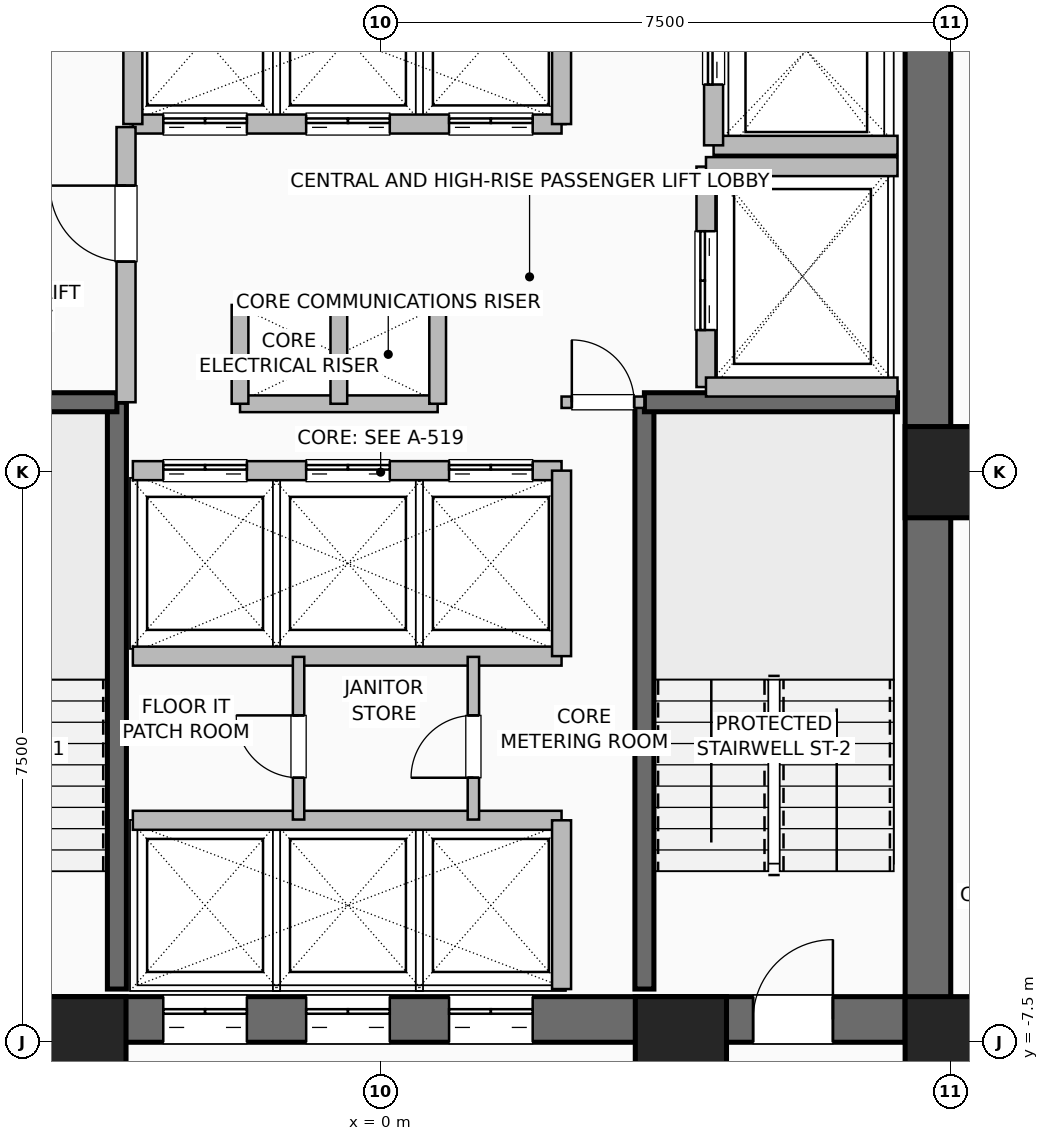
"""IFC4 building model, lengths in metres.
Left out: names, types, materials, properties, quantities, classifications, styles, units other than length and angle.
Written with IfcOpenShell. Run it as: python <this file> out.ifc"""

import sys

from ifc_helpers import new_model, si_unit, direction, frame, frame_2d, origin, origin_2d, place, context, subcontext, project, spatial, rectangle, hollow_rectangle, extrude, element, fill, save


model = new_model("IFC4")
c1 = context("Model", 3, precision=1e-05, world=origin(), true_north=direction((0.0, 1.0)))
c2 = subcontext(c1, "Body", "Model", "MODEL_VIEW")
j1 = project(units=[si_unit("LENGTHUNIT", "METRE"), si_unit("PLANEANGLEUNIT", "RADIAN")], contexts=[c1])
p1 = place(None, origin())
s1 = spatial("IfcSite", under=j1, at=p1, CompositionType="ELEMENT")
p2 = place(p1, origin())
s2 = spatial("IfcBuilding", under=s1, at=p2, CompositionType="ELEMENT")
p3 = place(p2, frame((0.0, 0.0, 72.5)))
s3 = spatial("IfcBuildingStorey", under=s2, at=p3, CompositionType="ELEMENT", Elevation=72.5)
for number, where, z_axis, x_axis in (
    (1, (-3.95, -7.5, 0.0), (0.0, 0.0, 1.0), (1.0, 0.0, 0.0)),
    (2, (3.95, -7.5, 0.0), (0.0, 0.0, 1.0), (1.0, 0.0, 0.0)),
    (3, (7.5, -7.5, 0.0), (0.0, 0.0, 1.0), (1.0, 0.0, 0.0)),
    (4, (7.5, 0.0, 0.0), (0.0, 0.0, 1.0), (1.0, 0.0, 0.0)),
):
    element("IfcColumn", number, at=place(p3, frame(where, z_axis=z_axis, x_axis=x_axis)), inside=s3, PredefinedType="COLUMN", context=c2, shape_type="SweptSolid", body=[
        extrude(hollow_rectangle(XDim=1.2, YDim=1.2, WallThickness=0.055, at=origin_2d()), origin(), (0.0, 0.0, 1.0), 3.5),
    ])
p4 = place(p3, frame((-7.5, -7.2, 0.0), z_axis=(0.0, 0.0, 1.0), x_axis=(1.0, 0.0, 0.0)))
e5 = element("IfcWall", 5, at=p4, inside=s3, PredefinedType="SHEAR", context=c2, shape_type="SweptSolid", body=[
    extrude(rectangle(XDim=15.0, YDim=0.6, at=frame_2d((7.5, 0.0))), origin(), (0.0, 0.0, 1.0), 3.25),
])
p5 = place(p4, frame((1.55, 0.0, 0.0)))
e6 = element("IfcOpeningElement", 6, at=p5, cuts=e5, PredefinedType="OPENING", context=c2, shape_type="SweptSolid", body=[
    extrude(rectangle(XDim=1.05, YDim=2.08, at=frame_2d((0.525, 1.04))), frame((0.0, 0.31, 0.0), z_axis=(0.0, -1.0, 0.0), x_axis=(1.0, 0.0, 0.0)), (0.0, 0.0, 1.0), 0.62),
])
p6 = place(p4, frame((12.4, 0.0, 0.0)))
e7 = element("IfcOpeningElement", 7, at=p6, cuts=e5, PredefinedType="OPENING", context=c2, shape_type="SweptSolid", body=[
    extrude(rectangle(XDim=1.05, YDim=2.08, at=frame_2d((0.525, 1.04))), frame((0.0, 0.31, 0.0), z_axis=(0.0, -1.0, 0.0), x_axis=(1.0, 0.0, 0.0)), (0.0, 0.0, 1.0), 0.62),
])
p7 = place(p4, frame((4.64, 0.0, 0.0)))
e8 = element("IfcOpeningElement", 8, at=p7, cuts=e5, PredefinedType="OPENING", context=c2, shape_type="SweptSolid", body=[
    extrude(rectangle(XDim=1.1, YDim=2.2, at=frame_2d((0.55, 1.1))), frame((0.0, 0.31, 0.0), z_axis=(0.0, -1.0, 0.0), x_axis=(1.0, 0.0, 0.0)), (0.0, 0.0, 1.0), 0.62),
])
p8 = place(p4, frame((6.52, 0.0, 0.0)))
e9 = element("IfcOpeningElement", 9, at=p8, cuts=e5, PredefinedType="OPENING", context=c2, shape_type="SweptSolid", body=[
    extrude(rectangle(XDim=1.1, YDim=2.2, at=frame_2d((0.55, 1.1))), frame((0.0, 0.31, 0.0), z_axis=(0.0, -1.0, 0.0), x_axis=(1.0, 0.0, 0.0)), (0.0, 0.0, 1.0), 0.62),
])
p9 = place(p4, frame((8.4, 0.0, 0.0)))
e10 = element("IfcOpeningElement", 10, at=p9, cuts=e5, PredefinedType="OPENING", context=c2, shape_type="SweptSolid", body=[
    extrude(rectangle(XDim=1.1, YDim=2.2, at=frame_2d((0.55, 1.1))), frame((0.0, 0.31, 0.0), z_axis=(0.0, -1.0, 0.0), x_axis=(1.0, 0.0, 0.0)), (0.0, 0.0, 1.0), 0.62),
])
p10 = place(p3, frame((7.2, -7.5, 0.0), z_axis=(0.0, 0.0, 1.0), x_axis=(0.0, 1.0, 0.0)))
e11 = element("IfcWall", 11, at=p10, inside=s3, PredefinedType="SHEAR", context=c2, shape_type="SweptSolid", body=[
    extrude(rectangle(XDim=15.0, YDim=0.6, at=frame_2d((7.5, 0.0))), origin(), (0.0, 0.0, 1.0), 3.25),
])
p11 = place(p3, frame((-3.47, -6.8, 0.0), z_axis=(0.0, 0.0, 1.0), x_axis=(0.0, 1.0, 0.0)))
e12 = element("IfcWall", 12, at=p11, inside=s3, PredefinedType="SHEAR", context=c2, shape_type="SweptSolid", body=[
    extrude(rectangle(XDim=7.72, YDim=0.25, at=frame_2d((3.86, 0.0))), origin(), (0.0, 0.0, 1.0), 3.25),
])
p12 = place(p3, frame((-6.8, 0.92, 0.0), z_axis=(0.0, 0.0, 1.0), x_axis=(1.0, 0.0, 0.0)))
e13 = element("IfcWall", 13, at=p12, inside=s3, PredefinedType="SHEAR", context=c2, shape_type="SweptSolid", body=[
    extrude(rectangle(XDim=3.33, YDim=0.25, at=frame_2d((1.665, 0.0))), origin(), (0.0, 0.0, 1.0), 3.25),
])
p13 = place(p3, frame((3.47, -6.8, 0.0), z_axis=(0.0, 0.0, 1.0), x_axis=(0.0, 1.0, 0.0)))
e14 = element("IfcWall", 14, at=p13, inside=s3, PredefinedType="SHEAR", context=c2, shape_type="SweptSolid", body=[
    extrude(rectangle(XDim=7.72, YDim=0.25, at=frame_2d((3.86, 0.0))), origin(), (0.0, 0.0, 1.0), 3.25),
])
p14 = place(p3, frame((3.47, 0.92, 0.0), z_axis=(0.0, 0.0, 1.0), x_axis=(1.0, 0.0, 0.0)))
e15 = element("IfcWall", 15, at=p14, inside=s3, PredefinedType="SHEAR", context=c2, shape_type="SweptSolid", body=[
    extrude(rectangle(XDim=3.33, YDim=0.25, at=frame_2d((1.665, 0.0))), origin(), (0.0, 0.0, 1.0), 3.25),
])
for number, where, z_axis, x_axis in (
    (16, (-1.85, 2.2, 0.0), (0.0, 0.0, 1.0), (1.0, 0.0, 0.0)),
    (17, (-1.85, 0.9, 0.0), (0.0, 0.0, 1.0), (1.0, 0.0, 0.0)),
):
    element("IfcWall", number, at=place(p3, frame(where, z_axis=z_axis, x_axis=x_axis)), inside=s3, PredefinedType="PARTITIONING", context=c2, shape_type="SweptSolid", body=[
        extrude(rectangle(XDim=2.6, YDim=0.22, at=frame_2d((1.3, 0.0))), origin(), (0.0, 0.0, 1.0), 3.25),
    ])
for number, where, z_axis, x_axis in (
    (18, (-0.55, 0.9, 0.0), (0.0, 0.0, 1.0), (0.0, 1.0, 0.0)),
    (19, (0.75, 0.9, 0.0), (0.0, 0.0, 1.0), (0.0, 1.0, 0.0)),
    (20, (-1.85, 0.9, 0.0), (0.0, 0.0, 1.0), (0.0, 1.0, 0.0)),
):
    element("IfcWall", number, at=place(p3, frame(where, z_axis=z_axis, x_axis=x_axis)), inside=s3, PredefinedType="PARTITIONING", context=c2, shape_type="SweptSolid", body=[
        extrude(rectangle(XDim=1.3, YDim=0.22, at=frame_2d((0.65, 0.0))), origin(), (0.0, 0.0, 1.0), 3.25),
    ])
p15 = place(p3, frame((-3.26, -4.58, 0.0), z_axis=(0.0, 0.0, 1.0), x_axis=(1.0, 0.0, 0.0)))
e21 = element("IfcWall", 21, at=p15, inside=s3, PredefinedType="SHEAR", context=c2, shape_type="SweptSolid", body=[
    extrude(rectangle(XDim=5.64, YDim=0.25, at=frame_2d((2.82, 0.0))), origin(), (0.0, 0.0, 1.0), 3.25),
])
p16 = place(p3, frame((2.38, -6.8, 0.0), z_axis=(0.0, 0.0, 1.0), x_axis=(0.0, 1.0, 0.0)))
e22 = element("IfcWall", 22, at=p16, inside=s3, PredefinedType="SHEAR", context=c2, shape_type="SweptSolid", body=[
    extrude(rectangle(XDim=2.22, YDim=0.25, at=frame_2d((1.11, 0.0))), origin(), (0.0, 0.0, 1.0), 3.25),
])
p17 = place(p3, frame((-3.26, 0.02, 0.0), z_axis=(0.0, 0.0, 1.0), x_axis=(1.0, 0.0, 0.0)))
e23 = element("IfcWall", 23, at=p17, inside=s3, PredefinedType="SHEAR", context=c2, shape_type="SweptSolid", body=[
    extrude(rectangle(XDim=5.64, YDim=0.25, at=frame_2d((2.82, 0.0))), origin(), (0.0, 0.0, 1.0), 3.25),
])
p18 = place(p17, frame((0.4, 0.0, 0.0)))
e24 = element("IfcOpeningElement", 24, at=p18, cuts=e23, PredefinedType="OPENING", context=c2, shape_type="SweptSolid", body=[
    extrude(rectangle(XDim=1.1, YDim=2.2, at=frame_2d((0.55, 1.1))), frame((0.0, 0.135, 0.0), z_axis=(0.0, -1.0, 0.0), x_axis=(1.0, 0.0, 0.0)), (0.0, 0.0, 1.0), 0.27),
])
p19 = place(p17, frame((2.28, 0.0, 0.0)))
e25 = element("IfcOpeningElement", 25, at=p19, cuts=e23, PredefinedType="OPENING", context=c2, shape_type="SweptSolid", body=[
    extrude(rectangle(XDim=1.1, YDim=2.2, at=frame_2d((0.55, 1.1))), frame((0.0, 0.135, 0.0), z_axis=(0.0, -1.0, 0.0), x_axis=(1.0, 0.0, 0.0)), (0.0, 0.0, 1.0), 0.27),
])
p20 = place(p17, frame((4.16, 0.0, 0.0)))
e26 = element("IfcOpeningElement", 26, at=p20, cuts=e23, PredefinedType="OPENING", context=c2, shape_type="SweptSolid", body=[
    extrude(rectangle(XDim=1.1, YDim=2.2, at=frame_2d((0.55, 1.1))), frame((0.0, 0.135, 0.0), z_axis=(0.0, -1.0, 0.0), x_axis=(1.0, 0.0, 0.0)), (0.0, 0.0, 1.0), 0.27),
])
p21 = place(p3, frame((-3.26, -2.42, 0.0), z_axis=(0.0, 0.0, 1.0), x_axis=(1.0, 0.0, 0.0)))
e27 = element("IfcWall", 27, at=p21, inside=s3, PredefinedType="SHEAR", context=c2, shape_type="SweptSolid", body=[
    extrude(rectangle(XDim=5.64, YDim=0.25, at=frame_2d((2.82, 0.0))), origin(), (0.0, 0.0, 1.0), 3.25),
])
p22 = place(p3, frame((2.38, -2.42, 0.0), z_axis=(0.0, 0.0, 1.0), x_axis=(0.0, 1.0, 0.0)))
e28 = element("IfcWall", 28, at=p22, inside=s3, PredefinedType="SHEAR", context=c2, shape_type="SweptSolid", body=[
    extrude(rectangle(XDim=2.44, YDim=0.25, at=frame_2d((1.22, 0.0))), origin(), (0.0, 0.0, 1.0), 3.25),
])
p23 = place(p3, frame((-3.26, 4.58, 0.0), z_axis=(0.0, 0.0, 1.0), x_axis=(1.0, 0.0, 0.0)))
e29 = element("IfcWall", 29, at=p23, inside=s3, PredefinedType="SHEAR", context=c2, shape_type="SweptSolid", body=[
    extrude(rectangle(XDim=5.64, YDim=0.25, at=frame_2d((2.82, 0.0))), origin(), (0.0, 0.0, 1.0), 3.25),
])
p24 = place(p23, frame((0.4, 0.0, 0.0)))
e30 = element("IfcOpeningElement", 30, at=p24, cuts=e29, PredefinedType="OPENING", context=c2, shape_type="SweptSolid", body=[
    extrude(rectangle(XDim=1.1, YDim=2.2, at=frame_2d((0.55, 1.1))), frame((0.0, 0.135, 0.0), z_axis=(0.0, -1.0, 0.0), x_axis=(1.0, 0.0, 0.0)), (0.0, 0.0, 1.0), 0.27),
])
p25 = place(p23, frame((2.28, 0.0, 0.0)))
e31 = element("IfcOpeningElement", 31, at=p25, cuts=e29, PredefinedType="OPENING", context=c2, shape_type="SweptSolid", body=[
    extrude(rectangle(XDim=1.1, YDim=2.2, at=frame_2d((0.55, 1.1))), frame((0.0, 0.135, 0.0), z_axis=(0.0, -1.0, 0.0), x_axis=(1.0, 0.0, 0.0)), (0.0, 0.0, 1.0), 0.27),
])
p26 = place(p23, frame((4.16, 0.0, 0.0)))
e32 = element("IfcOpeningElement", 32, at=p26, cuts=e29, PredefinedType="OPENING", context=c2, shape_type="SweptSolid", body=[
    extrude(rectangle(XDim=1.1, YDim=2.2, at=frame_2d((0.55, 1.1))), frame((0.0, 0.135, 0.0), z_axis=(0.0, -1.0, 0.0), x_axis=(1.0, 0.0, 0.0)), (0.0, 0.0, 1.0), 0.27),
])
for number, where, z_axis, x_axis in (
    (33, (-3.26, 4.58, 0.0), (0.0, 0.0, 1.0), (0.0, 1.0, 0.0)),
    (34, (2.38, 4.58, 0.0), (0.0, 0.0, 1.0), (0.0, 1.0, 0.0)),
):
    element("IfcWall", number, at=place(p3, frame(where, z_axis=z_axis, x_axis=x_axis)), inside=s3, PredefinedType="SHEAR", context=c2, shape_type="SweptSolid", body=[
        extrude(rectangle(XDim=2.22, YDim=0.25, at=frame_2d((1.11, 0.0))), origin(), (0.0, 0.0, 1.0), 3.25),
    ])
p27 = place(p3, frame((4.38, 4.3, 0.0), z_axis=(0.0, 0.0, 1.0), x_axis=(1.0, 0.0, 0.0)))
e35 = element("IfcWall", 35, at=p27, inside=s3, PredefinedType="SHEAR", context=c2, shape_type="SweptSolid", body=[
    extrude(rectangle(XDim=2.42, YDim=0.25, at=frame_2d((1.21, 0.0))), origin(), (0.0, 0.0, 1.0), 3.25),
])
p28 = place(p3, frame((4.38, 4.3, 0.0), z_axis=(0.0, 0.0, 1.0), x_axis=(0.0, 1.0, 0.0)))
e36 = element("IfcWall", 36, at=p28, inside=s3, PredefinedType="SHEAR", context=c2, shape_type="SweptSolid", body=[
    extrude(rectangle(XDim=2.5, YDim=0.25, at=frame_2d((1.25, 0.0))), origin(), (0.0, 0.0, 1.0), 3.25),
])
p29 = place(p28, frame((0.8, 0.0, 0.0)))
e37 = element("IfcOpeningElement", 37, at=p29, cuts=e36, PredefinedType="OPENING", context=c2, shape_type="SweptSolid", body=[
    extrude(rectangle(XDim=1.2, YDim=2.2, at=frame_2d((0.6, 1.1))), frame((0.0, 0.135, 0.0), z_axis=(0.0, -1.0, 0.0), x_axis=(1.0, 0.0, 0.0)), (0.0, 0.0, 1.0), 0.27),
])
p30 = place(p3, frame((4.28, 1.12, 0.0), z_axis=(0.0, 0.0, 1.0), x_axis=(0.0, 1.0, 0.0)))
e38 = element("IfcWall", 38, at=p30, inside=s3, PredefinedType="SHEAR", context=c2, shape_type="SweptSolid", body=[
    extrude(rectangle(XDim=2.9, YDim=0.25, at=frame_2d((1.45, 0.0))), origin(), (0.0, 0.0, 1.0), 3.25),
])
p31 = place(p30, frame((0.75, 0.0, 0.0)))
e39 = element("IfcOpeningElement", 39, at=p31, cuts=e38, PredefinedType="OPENING", context=c2, shape_type="SweptSolid", body=[
    extrude(rectangle(XDim=1.3, YDim=2.3, at=frame_2d((0.65, 1.15))), frame((0.0, 0.135, 0.0), z_axis=(0.0, -1.0, 0.0), x_axis=(1.0, 0.0, 0.0)), (0.0, 0.0, 1.0), 0.27),
])
for number, where, z_axis, x_axis in (
    (40, (4.28, 1.12, 0.0), (0.0, 0.0, 1.0), (1.0, 0.0, 0.0)),
    (41, (4.28, 4.02, 0.0), (0.0, 0.0, 1.0), (1.0, 0.0, 0.0)),
):
    element("IfcWall", number, at=place(p3, frame(where, z_axis=z_axis, x_axis=x_axis)), inside=s3, PredefinedType="SHEAR", context=c2, shape_type="SweptSolid", body=[
        extrude(rectangle(XDim=2.52, YDim=0.25, at=frame_2d((1.26, 0.0))), origin(), (0.0, 0.0, 1.0), 3.25),
    ])
p32 = place(p3, frame((-3.35, 0.92, 0.0), z_axis=(0.0, 0.0, 1.0), x_axis=(0.0, 1.0, 0.0)))
e42 = element("IfcWall", 42, at=p32, inside=s3, PredefinedType="SHEAR", context=c2, shape_type="SweptSolid", body=[
    extrude(rectangle(XDim=3.62, YDim=0.25, at=frame_2d((1.81, 0.0))), origin(), (0.0, 0.0, 1.0), 3.25),
])
p33 = place(p32, frame((1.85, 0.0, 0.0)))
e43 = element("IfcOpeningElement", 43, at=p33, cuts=e42, PredefinedType="OPENING", context=c2, shape_type="SweptSolid", body=[
    extrude(rectangle(XDim=1.0, YDim=2.08, at=frame_2d((0.5, 1.04))), frame((0.0, 0.135, 0.0), z_axis=(0.0, -1.0, 0.0), x_axis=(1.0, 0.0, 0.0)), (0.0, 0.0, 1.0), 0.27),
])
p34 = place(p3, frame((2.38, 0.92, 0.0), z_axis=(0.0, 0.0, 1.0), x_axis=(1.0, 0.0, 0.0)))
e44 = element("IfcWall", 44, at=p34, inside=s3, PredefinedType="PARTITIONING", context=c2, shape_type="SweptSolid", body=[
    extrude(rectangle(XDim=1.09, YDim=0.15, at=frame_2d((0.545, 0.0))), origin(), (0.0, 0.0, 1.0), 3.25),
])
p35 = place(p34, frame((0.135, 0.0, 0.0)))
e45 = element("IfcOpeningElement", 45, at=p35, cuts=e44, PredefinedType="OPENING", context=c2, shape_type="SweptSolid", body=[
    extrude(rectangle(XDim=0.82, YDim=2.05, at=frame_2d((0.41, 1.025))), frame((0.0, 0.085, 0.0), z_axis=(0.0, -1.0, 0.0), x_axis=(1.0, 0.0, 0.0)), (0.0, 0.0, 1.0), 0.17),
])
p36 = place(p3, frame((-1.08, -4.57, 0.0), z_axis=(0.0, 0.0, 1.0), x_axis=(0.0, 1.0, 0.0)))
e46 = element("IfcWall", 46, at=p36, inside=s3, PredefinedType="PARTITIONING", context=c2, shape_type="SweptSolid", body=[
    extrude(rectangle(XDim=2.14, YDim=0.15, at=frame_2d((1.07, 0.0))), origin(), (0.0, 0.0, 1.0), 3.25),
])
p37 = place(p36, frame((0.55, 0.0, 0.0)))
e47 = element("IfcOpeningElement", 47, at=p37, cuts=e46, PredefinedType="OPENING", context=c2, shape_type="SweptSolid", body=[
    extrude(rectangle(XDim=0.82, YDim=2.05, at=frame_2d((0.41, 1.025))), frame((0.0, 0.085, 0.0), z_axis=(0.0, -1.0, 0.0), x_axis=(1.0, 0.0, 0.0)), (0.0, 0.0, 1.0), 0.17),
])
p38 = place(p3, frame((1.22, -4.57, 0.0), z_axis=(0.0, 0.0, 1.0), x_axis=(0.0, 1.0, 0.0)))
e48 = element("IfcWall", 48, at=p38, inside=s3, PredefinedType="PARTITIONING", context=c2, shape_type="SweptSolid", body=[
    extrude(rectangle(XDim=2.14, YDim=0.15, at=frame_2d((1.07, 0.0))), origin(), (0.0, 0.0, 1.0), 3.25),
])
p39 = place(p38, frame((0.55, 0.0, 0.0)))
e49 = element("IfcOpeningElement", 49, at=p39, cuts=e48, PredefinedType="OPENING", context=c2, shape_type="SweptSolid", body=[
    extrude(rectangle(XDim=0.82, YDim=2.05, at=frame_2d((0.41, 1.025))), frame((0.0, 0.085, 0.0), z_axis=(0.0, -1.0, 0.0), x_axis=(1.0, 0.0, 0.0)), (0.0, 0.0, 1.0), 0.17),
])
p40 = place(p6, origin())
e50 = element("IfcDoor", 50, at=p40, inside=s3, OperationType="SINGLE_SWING_RIGHT", PredefinedType="DOOR", context=c2, shape_type="SweptSolid", body=[
    extrude(rectangle(XDim=1.05, YDim=2.08, at=frame_2d((0.525, 1.04))), frame((0.0, 0.025, 0.0), z_axis=(0.0, -1.0, 0.0), x_axis=(1.0, 0.0, 0.0)), (0.0, 0.0, 1.0), 0.05),
])
fill(e7, e50)
p41 = place(p7, origin())
e51 = element("IfcDoor", 51, at=p41, inside=s3, OperationType="DOUBLE_DOOR_SLIDING", PredefinedType="DOOR", context=c2, shape_type="SweptSolid", body=[
    extrude(rectangle(XDim=1.1, YDim=2.2, at=frame_2d((0.55, 1.1))), frame((0.0, 0.025, 0.0), z_axis=(0.0, -1.0, 0.0), x_axis=(1.0, 0.0, 0.0)), (0.0, 0.0, 1.0), 0.05),
])
fill(e8, e51)
p42 = place(p8, origin())
e52 = element("IfcDoor", 52, at=p42, inside=s3, OperationType="DOUBLE_DOOR_SLIDING", PredefinedType="DOOR", context=c2, shape_type="SweptSolid", body=[
    extrude(rectangle(XDim=1.1, YDim=2.2, at=frame_2d((0.55, 1.1))), frame((0.0, 0.025, 0.0), z_axis=(0.0, -1.0, 0.0), x_axis=(1.0, 0.0, 0.0)), (0.0, 0.0, 1.0), 0.05),
])
fill(e9, e52)
p43 = place(p9, origin())
e53 = element("IfcDoor", 53, at=p43, inside=s3, OperationType="DOUBLE_DOOR_SLIDING", PredefinedType="DOOR", context=c2, shape_type="SweptSolid", body=[
    extrude(rectangle(XDim=1.1, YDim=2.2, at=frame_2d((0.55, 1.1))), frame((0.0, 0.025, 0.0), z_axis=(0.0, -1.0, 0.0), x_axis=(1.0, 0.0, 0.0)), (0.0, 0.0, 1.0), 0.05),
])
fill(e10, e53)
p44 = place(p18, origin())
e54 = element("IfcDoor", 54, at=p44, inside=s3, OperationType="DOUBLE_DOOR_SLIDING", PredefinedType="DOOR", context=c2, shape_type="SweptSolid", body=[
    extrude(rectangle(XDim=1.1, YDim=2.2, at=frame_2d((0.55, 1.1))), frame((0.0, 0.025, 0.0), z_axis=(0.0, -1.0, 0.0), x_axis=(1.0, 0.0, 0.0)), (0.0, 0.0, 1.0), 0.05),
])
fill(e24, e54)
p45 = place(p19, origin())
e55 = element("IfcDoor", 55, at=p45, inside=s3, OperationType="DOUBLE_DOOR_SLIDING", PredefinedType="DOOR", context=c2, shape_type="SweptSolid", body=[
    extrude(rectangle(XDim=1.1, YDim=2.2, at=frame_2d((0.55, 1.1))), frame((0.0, 0.025, 0.0), z_axis=(0.0, -1.0, 0.0), x_axis=(1.0, 0.0, 0.0)), (0.0, 0.0, 1.0), 0.05),
])
fill(e25, e55)
p46 = place(p20, origin())
e56 = element("IfcDoor", 56, at=p46, inside=s3, OperationType="DOUBLE_DOOR_SLIDING", PredefinedType="DOOR", context=c2, shape_type="SweptSolid", body=[
    extrude(rectangle(XDim=1.1, YDim=2.2, at=frame_2d((0.55, 1.1))), frame((0.0, 0.025, 0.0), z_axis=(0.0, -1.0, 0.0), x_axis=(1.0, 0.0, 0.0)), (0.0, 0.0, 1.0), 0.05),
])
fill(e26, e56)
p47 = place(p24, origin())
e57 = element("IfcDoor", 57, at=p47, inside=s3, OperationType="DOUBLE_DOOR_SLIDING", PredefinedType="DOOR", context=c2, shape_type="SweptSolid", body=[
    extrude(rectangle(XDim=1.1, YDim=2.2, at=frame_2d((0.55, 1.1))), frame((0.0, 0.025, 0.0), z_axis=(0.0, -1.0, 0.0), x_axis=(1.0, 0.0, 0.0)), (0.0, 0.0, 1.0), 0.05),
])
fill(e30, e57)
p48 = place(p25, origin())
e58 = element("IfcDoor", 58, at=p48, inside=s3, OperationType="DOUBLE_DOOR_SLIDING", PredefinedType="DOOR", context=c2, shape_type="SweptSolid", body=[
    extrude(rectangle(XDim=1.1, YDim=2.2, at=frame_2d((0.55, 1.1))), frame((0.0, 0.025, 0.0), z_axis=(0.0, -1.0, 0.0), x_axis=(1.0, 0.0, 0.0)), (0.0, 0.0, 1.0), 0.05),
])
fill(e31, e58)
p49 = place(p26, origin())
e59 = element("IfcDoor", 59, at=p49, inside=s3, OperationType="DOUBLE_DOOR_SLIDING", PredefinedType="DOOR", context=c2, shape_type="SweptSolid", body=[
    extrude(rectangle(XDim=1.1, YDim=2.2, at=frame_2d((0.55, 1.1))), frame((0.0, 0.025, 0.0), z_axis=(0.0, -1.0, 0.0), x_axis=(1.0, 0.0, 0.0)), (0.0, 0.0, 1.0), 0.05),
])
fill(e32, e59)
p50 = place(p29, origin())
e60 = element("IfcDoor", 60, at=p50, inside=s3, OperationType="DOUBLE_DOOR_SLIDING", PredefinedType="DOOR", context=c2, shape_type="SweptSolid", body=[
    extrude(rectangle(XDim=1.2, YDim=2.2, at=frame_2d((0.6, 1.1))), frame((0.0, 0.025, 0.0), z_axis=(0.0, -1.0, 0.0), x_axis=(1.0, 0.0, 0.0)), (0.0, 0.0, 1.0), 0.05),
])
fill(e37, e60)
p51 = place(p31, origin())
e61 = element("IfcDoor", 61, at=p51, inside=s3, OperationType="DOUBLE_DOOR_SLIDING", PredefinedType="DOOR", context=c2, shape_type="SweptSolid", body=[
    extrude(rectangle(XDim=1.3, YDim=2.3, at=frame_2d((0.65, 1.15))), frame((0.0, 0.025, 0.0), z_axis=(0.0, -1.0, 0.0), x_axis=(1.0, 0.0, 0.0)), (0.0, 0.0, 1.0), 0.05),
])
fill(e39, e61)
p52 = place(p33, origin())
e62 = element("IfcDoor", 62, at=p52, inside=s3, OperationType="SINGLE_SWING_RIGHT", PredefinedType="DOOR", context=c2, shape_type="SweptSolid", body=[
    extrude(rectangle(XDim=1.0, YDim=2.08, at=frame_2d((0.5, 1.04))), frame((0.0, 0.025, 0.0), z_axis=(0.0, -1.0, 0.0), x_axis=(1.0, 0.0, 0.0)), (0.0, 0.0, 1.0), 0.05),
])
fill(e43, e62)
p53 = place(p35, origin())
e63 = element("IfcDoor", 63, at=p53, inside=s3, OperationType="SINGLE_SWING_LEFT", PredefinedType="DOOR", context=c2, shape_type="SweptSolid", body=[
    extrude(rectangle(XDim=0.82, YDim=2.05, at=frame_2d((0.41, 1.025))), frame((0.0, 0.025, 0.0), z_axis=(0.0, -1.0, 0.0), x_axis=(1.0, 0.0, 0.0)), (0.0, 0.0, 1.0), 0.05),
])
fill(e45, e63)
p54 = place(p37, origin())
e64 = element("IfcDoor", 64, at=p54, inside=s3, OperationType="SINGLE_SWING_RIGHT", PredefinedType="DOOR", context=c2, shape_type="SweptSolid", body=[
    extrude(rectangle(XDim=0.82, YDim=2.05, at=frame_2d((0.41, 1.025))), frame((0.0, 0.025, 0.0), z_axis=(0.0, -1.0, 0.0), x_axis=(1.0, 0.0, 0.0)), (0.0, 0.0, 1.0), 0.05),
])
fill(e47, e64)
p55 = place(p39, origin())
e65 = element("IfcDoor", 65, at=p55, inside=s3, OperationType="SINGLE_SWING_LEFT", PredefinedType="DOOR", context=c2, shape_type="SweptSolid", body=[
    extrude(rectangle(XDim=0.82, YDim=2.05, at=frame_2d((0.41, 1.025))), frame((0.0, 0.025, 0.0), z_axis=(0.0, -1.0, 0.0), x_axis=(1.0, 0.0, 0.0)), (0.0, 0.0, 1.0), 0.05),
])
fill(e49, e65)
save(model, sys.argv[1])
